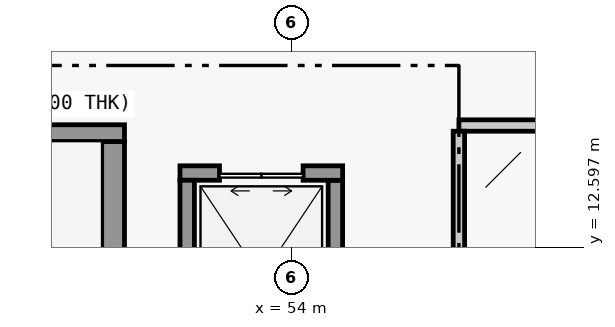
"""IFC4 building model, lengths in metres.
Left out: names, types, materials, properties, quantities, classifications, styles, units other than length and angle.
Written with IfcOpenShell. Run it as: python <this file> out.ifc"""

import sys

from ifc_helpers import new_model, si_unit, direction, frame, frame_2d, origin, place, context, subcontext, project, spatial, rectangle, extrude, element, fill, save


model = new_model("IFC4")
c1 = context("Model", 3, precision=1e-05, world=origin(), true_north=direction((0.0, 1.0)))
c2 = subcontext(c1, "Body", "Model", "MODEL_VIEW")
j1 = project(units=[si_unit("LENGTHUNIT", "METRE"), si_unit("PLANEANGLEUNIT", "RADIAN")], contexts=[c1])
p1 = place(None, origin())
s1 = spatial("IfcSite", under=j1, at=p1, CompositionType="ELEMENT")
p2 = place(p1, origin())
s2 = spatial("IfcBuilding", under=s1, at=p2, CompositionType="ELEMENT")
p3 = place(p2, origin())
s3 = spatial("IfcBuildingStorey", under=s2, at=p3, CompositionType="ELEMENT", Elevation=0.0)
p4 = place(p3, frame((51.65, 9.8, 0.0), z_axis=(0.0, 0.0, 1.0), x_axis=(0.0, 1.0, 0.0)))
e1 = element("IfcWall", 1, at=p4, inside=s3, PredefinedType="SHEAR", context=c2, shape_type="SweptSolid", body=[
    extrude(rectangle(XDim=4.19, YDim=0.3, at=frame_2d((2.095, 0.0))), origin(), (0.0, 0.0, 1.0), 4.52),
])
p5 = place(p3, frame((51.8, 14.1, 0.0), z_axis=(0.0, 0.0, 1.0), x_axis=(-1.0, 0.0, 0.0)))
e2 = element("IfcWall", 2, at=p5, inside=s3, PredefinedType="SOLIDWALL", context=c2, shape_type="SweptSolid", body=[
    extrude(rectangle(XDim=9.22, YDim=0.22, at=frame_2d((4.61, 0.0))), origin(), (0.0, 0.0, 1.0), 4.52),
])
p6 = place(p3, frame((54.575, 10.92, 0.0), z_axis=(0.0, 0.0, 1.0), x_axis=(0.0, 1.0, 0.0)))
e3 = element("IfcWall", 3, at=p6, inside=s3, PredefinedType="SOLIDWALL", context=c2, shape_type="SweptSolid", body=[
    extrude(rectangle(XDim=2.56, YDim=0.19, at=frame_2d((1.28, 0.0))), origin(), (0.0, 0.0, 1.0), 4.52),
])
p7 = place(p3, frame((54.67, 13.575, 0.0), z_axis=(0.0, 0.0, 1.0), x_axis=(-1.0, 0.0, 0.0)))
e4 = element("IfcWall", 4, at=p7, inside=s3, PredefinedType="SOLIDWALL", context=c2, shape_type="SweptSolid", body=[
    extrude(rectangle(XDim=2.14, YDim=0.19, at=frame_2d((1.07, 0.0))), origin(), (0.0, 0.0, 1.0), 4.52),
])
p8 = place(p7, frame((0.52, 0.0, 0.0)))
e5 = element("IfcOpeningElement", 5, at=p8, cuts=e4, PredefinedType="OPENING", context=c2, shape_type="SweptSolid", body=[
    extrude(rectangle(XDim=1.1, YDim=2.2, at=frame_2d((0.55, 1.1))), frame((0.0, 0.11, 0.0), z_axis=(0.0, -1.0, 0.0), x_axis=(1.0, 0.0, 0.0)), (0.0, 0.0, 1.0), 0.22),
])
p9 = place(p3, frame((52.625, 13.48, 0.0), z_axis=(0.0, 0.0, 1.0), x_axis=(0.0, -1.0, 0.0)))
e6 = element("IfcWall", 6, at=p9, inside=s3, PredefinedType="SOLIDWALL", context=c2, shape_type="SweptSolid", body=[
    extrude(rectangle(XDim=2.56, YDim=0.19, at=frame_2d((1.28, 0.0))), origin(), (0.0, 0.0, 1.0), 4.52),
])
p10 = place(p3, frame((56.2, 14.2, 0.0), z_axis=(0.0, 0.0, 1.0), x_axis=(1.0, 0.0, 0.0)))
e7 = element("IfcWall", 7, at=p10, inside=s3, PredefinedType="PLUMBINGWALL", context=c2, shape_type="SweptSolid", body=[
    extrude(rectangle(XDim=12.18, YDim=0.15, at=frame_2d((6.09, 0.0))), origin(), (0.0, 0.0, 1.0), 4.52),
])
p11 = place(p10, frame((5.22, 0.0, 0.0)))
e8 = element("IfcOpeningElement", 8, at=p11, cuts=e7, PredefinedType="OPENING", context=c2, shape_type="SweptSolid", body=[
    extrude(rectangle(XDim=1.65, YDim=2.25, at=frame_2d((0.825, 1.125))), frame((0.0, 0.09, 0.0), z_axis=(0.0, -1.0, 0.0), x_axis=(1.0, 0.0, 0.0)), (0.0, 0.0, 1.0), 0.18),
])
p12 = place(p3, frame((56.2, 0.16, 0.0), z_axis=(0.0, 0.0, 1.0), x_axis=(0.0, 1.0, 0.0)))
e9 = element("IfcWall", 9, at=p12, inside=s3, PredefinedType="PLUMBINGWALL", context=c2, shape_type="SweptSolid", body=[
    extrude(rectangle(XDim=13.965, YDim=0.15, at=frame_2d((6.982, 0.0))), origin(), (0.0, 0.0, 1.0), 4.52),
])
p13 = place(p8, origin())
e10 = element("IfcDoor", 10, at=p13, inside=s3, OperationType="DOUBLE_DOOR_SLIDING", PredefinedType="DOOR", context=c2, shape_type="SweptSolid", body=[
    extrude(rectangle(XDim=1.1, YDim=2.2, at=frame_2d((0.55, 1.1))), frame((0.0, 0.025, 0.0), z_axis=(0.0, -1.0, 0.0), x_axis=(1.0, 0.0, 0.0)), (0.0, 0.0, 1.0), 0.05),
])
fill(e5, e10)
save(model, sys.argv[1])
